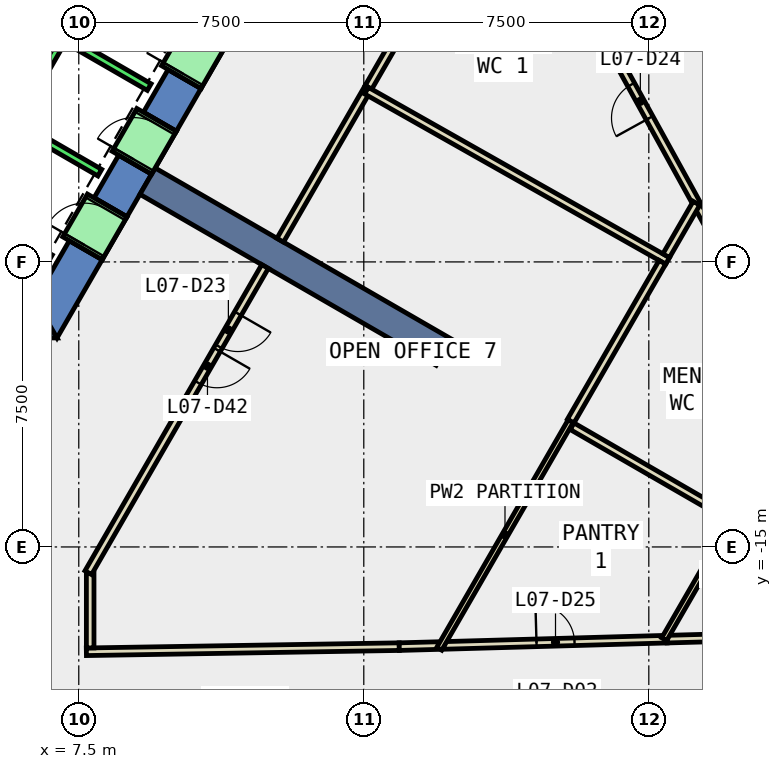
"""IFC4 building model, lengths in metres.
Left out: names, types, materials, properties, quantities, classifications, styles, units other than length and angle.
Written with IfcOpenShell. Run it as: python <this file> out.ifc"""

import sys

from ifc_helpers import new_model, si_unit, direction, frame, frame_2d, origin, place, context, subcontext, project, spatial, polyline, rectangle, outline, extrude, element, fill, save


model = new_model("IFC4")
c1 = context("Model", 3, precision=1e-05, world=origin(), true_north=direction((0.0, 1.0)))
c2 = subcontext(c1, "Body", "Model", "MODEL_VIEW")
j1 = project(units=[si_unit("LENGTHUNIT", "METRE"), si_unit("PLANEANGLEUNIT", "RADIAN")], contexts=[c1])
p1 = place(None, origin())
s1 = spatial("IfcSite", under=j1, at=p1, CompositionType="ELEMENT")
p2 = place(p1, origin())
s2 = spatial("IfcBuilding", under=s1, at=p2, CompositionType="ELEMENT")
p3 = place(p2, frame((0.0, 0.0, 39.2)))
s3 = spatial("IfcBuildingStorey", under=s2, at=p3, CompositionType="ELEMENT", Elevation=39.2)
p4 = place(p3, frame((0.0, 0.0, -0.4)))
e1 = element("IfcWall", 1, at=p4, inside=s3, PredefinedType="SHEAR", context=c2, shape_type="SweptSolid", body=[
    extrude(outline(polyline([(5.75, -8.5), (5.75, -9.5), (6.928, -9.5), (6.351, -8.5), (5.75, -8.5)])), origin(), (0.0, 0.0, 1.0), 4.2),
])
p5 = place(p3, frame((0.0, 0.0, -0.4)))
e2 = element("IfcWall", 2, at=p5, inside=s3, PredefinedType="SHEAR", context=c2, shape_type="SweptSolid", body=[
    extrude(outline(polyline([(8.117, -7.44), (7.252, -6.94), (6.351, -8.5), (6.928, -9.5), (8.117, -7.44)])), origin(), (0.0, 0.0, 1.0), 4.2),
])
p6 = place(p3, frame((0.0, 0.0, -0.4)))
e3 = element("IfcWall", 3, at=p6, inside=s3, PredefinedType="SHEAR", context=c2, shape_type="SweptSolid", body=[
    extrude(outline(polyline([(9.417, -5.189), (8.551, -4.689), (7.902, -5.814), (8.767, -6.314), (9.417, -5.189)])), origin(), (0.0, 0.0, 1.0), 4.2),
])
p7 = place(p3, frame((0.0, 0.0, -0.4)))
e4 = element("IfcWall", 4, at=p7, inside=s3, PredefinedType="SHEAR", context=c2, shape_type="SweptSolid", body=[
    extrude(outline(polyline([(10.717, -2.937), (9.851, -2.437), (9.201, -3.563), (10.067, -4.063), (10.717, -2.937)])), origin(), (0.0, 0.0, 1.0), 4.2),
])
p8 = place(p3, frame((0.0, 0.0, 3.6)))
e5 = element("IfcWall", 5, at=p8, inside=s3, PredefinedType="SHEAR", context=c2, shape_type="SweptSolid", body=[
    extrude(outline(polyline([(8.767, -6.314), (7.902, -5.814), (7.252, -6.94), (8.117, -7.44), (8.767, -6.314)])), origin(), (0.0, 0.0, 1.0), 0.2),
])
p9 = place(p3, frame((0.0, 0.0, 3.6)))
e6 = element("IfcWall", 6, at=p9, inside=s3, PredefinedType="SHEAR", context=c2, shape_type="SweptSolid", body=[
    extrude(outline(polyline([(10.067, -4.063), (9.201, -3.563), (8.551, -4.689), (9.417, -5.189), (10.067, -4.063)])), origin(), (0.0, 0.0, 1.0), 0.2),
])
p10 = place(p3, frame((0.0, 0.0, 3.6)))
e7 = element("IfcWall", 7, at=p10, inside=s3, PredefinedType="SHEAR", context=c2, shape_type="SweptSolid", body=[
    extrude(outline(polyline([(11.367, -1.811), (10.501, -1.311), (9.851, -2.437), (10.717, -2.937), (11.367, -1.811)])), origin(), (0.0, 0.0, 1.0), 0.2),
])
p11 = place(p3, frame((9.31, -5.375, -0.4), z_axis=(0.0, 0.0, 1.0), x_axis=(0.866017533419, -0.500013631625, 0.0)))
e8 = element("IfcWall", 8, at=p11, inside=s3, PredefinedType="SHEAR", context=c2, shape_type="SweptSolid", body=[
    extrude(rectangle(XDim=9.0, YDim=0.8, at=frame_2d((4.5, 0.0))), origin(), (0.0, 0.0, 1.0), 4.2),
])
p12 = place(p3, frame((7.7, -17.758, 0.0), z_axis=(0.0, 0.0, 1.0), x_axis=(0.999865574926, 0.016396099485, 0.0)))
e9 = element("IfcWall", 9, at=p12, inside=s3, PredefinedType="PARTITIONING", context=c2, shape_type="SweptSolid", body=[
    extrude(rectangle(XDim=8.234, YDim=0.2, at=frame_2d((4.117, 0.0))), origin(), (0.0, 0.0, 1.0), 3.8),
])
p13 = place(p3, frame((15.933, -17.623, 0.0), z_axis=(0.0, 0.0, 1.0), x_axis=(0.999627129061, 0.027305729179, 0.0)))
e10 = element("IfcWall", 10, at=p13, inside=s3, PredefinedType="PARTITIONING", context=c2, shape_type="SweptSolid", body=[
    extrude(rectangle(XDim=1.028, YDim=0.2, at=frame_2d((0.514, 0.0))), origin(), (0.0, 0.0, 1.0), 3.8),
])
p14 = place(p3, frame((23.803, -6.044, 0.0), z_axis=(0.0, 0.0, 1.0), x_axis=(-0.482588436287, 0.875847247619, 0.0)))
e11 = element("IfcWall", 11, at=p14, inside=s3, PredefinedType="PARTITIONING", context=c2, shape_type="SweptSolid", body=[
    extrude(rectangle(XDim=6.324, YDim=0.2, at=frame_2d((3.162, 0.0))), origin(), (0.0, 0.0, 1.0), 3.8),
])
p15 = place(p14, frame((2.662, 0.0, 0.0)))
e12 = element("IfcOpeningElement", 12, at=p15, cuts=e11, PredefinedType="OPENING", context=c2, shape_type="SweptSolid", body=[
    extrude(rectangle(XDim=1.0, YDim=2.1, at=frame_2d((0.5, 1.05))), frame((0.0, 0.11, 0.0), z_axis=(0.0, -1.0, 0.0), x_axis=(1.0, 0.0, 0.0)), (0.0, 0.0, 1.0), 0.22),
])
p16 = place(p3, frame((17.111, -17.591, 0.0), z_axis=(0.0, 0.0, 1.0), x_axis=(0.99960470841, 0.028114532261, 0.0)))
e13 = element("IfcWall", 13, at=p16, inside=s3, PredefinedType="PARTITIONING", context=c2, shape_type="SweptSolid", body=[
    extrude(rectangle(XDim=5.87, YDim=0.2, at=frame_2d((2.935, 0.0))), origin(), (0.0, 0.0, 1.0), 3.8),
])
p17 = place(p16, frame((2.435, 0.0, 0.0)))
e14 = element("IfcOpeningElement", 14, at=p17, cuts=e13, PredefinedType="OPENING", context=c2, shape_type="SweptSolid", body=[
    extrude(rectangle(XDim=1.0, YDim=2.1, at=frame_2d((0.5, 1.05))), frame((0.0, 0.11, 0.0), z_axis=(0.0, -1.0, 0.0), x_axis=(1.0, 0.0, 0.0)), (0.0, 0.0, 1.0), 0.22),
])
p18 = place(p3, frame((24.229, -6.818, 0.0), z_axis=(0.0, 0.0, 1.0), x_axis=(-0.482120251302, 0.876105052653, 0.0)))
e15 = element("IfcWall", 15, at=p18, inside=s3, PredefinedType="PARTITIONING", context=c2, shape_type="SweptSolid", body=[
    extrude(rectangle(XDim=0.884, YDim=0.2, at=frame_2d((0.442, 0.0))), origin(), (0.0, 0.0, 1.0), 3.8),
])
p19 = place(p3, frame((22.979, -17.426, 0.0), z_axis=(0.0, 0.0, 1.0), x_axis=(0.999623609507, 0.027434272674, 0.0)))
e16 = element("IfcWall", 16, at=p19, inside=s3, PredefinedType="PARTITIONING", context=c2, shape_type="SweptSolid", body=[
    extrude(rectangle(XDim=1.201, YDim=0.2, at=frame_2d((0.601, 0.0))), origin(), (0.0, 0.0, 1.0), 3.8),
])
p20 = place(p3, frame((22.847, 0.664, 0.0), z_axis=(0.0, 0.0, 1.0), x_axis=(0.482537844436, -0.875875121628, 0.0)))
e17 = element("IfcWall", 17, at=p20, inside=s3, PredefinedType="PARTITIONING", context=c2, shape_type="SweptSolid", body=[
    extrude(rectangle(XDim=3.542, YDim=0.2, at=frame_2d((1.771, 0.0))), origin(), (0.0, 0.0, 1.0), 3.8),
])
p21 = place(p3, frame((7.8, -15.69, 0.0), z_axis=(0.0, 0.0, 1.0), x_axis=(0.0, -1.0, 0.0)))
e18 = element("IfcWall", 18, at=p21, inside=s3, PredefinedType="PARTITIONING", context=c2, shape_type="SweptSolid", body=[
    extrude(rectangle(XDim=1.967, YDim=0.2, at=frame_2d((0.983, 0.0))), origin(), (0.0, 0.0, 1.0), 3.8),
])
p22 = place(p3, frame((15.122, -2.908, 0.0), z_axis=(0.0, 0.0, 1.0), x_axis=(-0.499922740561, -0.866070004948, 0.0)))
e19 = element("IfcWall", 19, at=p22, inside=s3, PredefinedType="PARTITIONING", context=c2, shape_type="SweptSolid", body=[
    extrude(rectangle(XDim=4.643, YDim=0.2, at=frame_2d((2.321, 0.0))), origin(), (0.0, 0.0, 1.0), 3.8),
])
p23 = place(p3, frame((18.705, 3.298, 0.0), z_axis=(0.0, 0.0, 1.0), x_axis=(-0.499993769413, -0.866029000986, 0.0)))
e20 = element("IfcWall", 20, at=p23, inside=s3, PredefinedType="PARTITIONING", context=c2, shape_type="SweptSolid", body=[
    extrude(rectangle(XDim=7.166, YDim=0.2, at=frame_2d((3.583, 0.0))), origin(), (0.0, 0.0, 1.0), 3.8),
])
p24 = place(p3, frame((15.072, -2.994, 0.0), z_axis=(0.0, 0.0, 1.0), x_axis=(0.87054185148, -0.49209438609, 0.0)))
e21 = element("IfcWall", 21, at=p24, inside=s3, PredefinedType="PARTITIONING", context=c2, shape_type="SweptSolid", body=[
    extrude(rectangle(XDim=9.1, YDim=0.2, at=frame_2d((4.55, 0.0))), origin(), (0.0, 0.0, 1.0), 3.8),
])
p25 = place(p3, frame((20.445, -11.688, 0.0), z_axis=(0.0, 0.0, 1.0), x_axis=(-0.500010633597, -0.866019264387, 0.0)))
e22 = element("IfcWall", 22, at=p25, inside=s3, PredefinedType="PARTITIONING", context=c2, shape_type="SweptSolid", body=[
    extrude(rectangle(XDim=6.918, YDim=0.15, at=frame_2d((3.459, 0.0))), origin(), (0.0, 0.0, 1.0), 3.8),
])
p26 = place(p3, frame((22.857, -7.51, 0.0), z_axis=(0.0, 0.0, 1.0), x_axis=(-0.499954636112, -0.866051593054, 0.0)))
e23 = element("IfcWall", 23, at=p26, inside=s3, PredefinedType="PARTITIONING", context=c2, shape_type="SweptSolid", body=[
    extrude(rectangle(XDim=4.824, YDim=0.2, at=frame_2d((2.412, 0.0))), origin(), (0.0, 0.0, 1.0), 3.8),
])
p27 = place(p3, frame((23.754, -5.956, 0.0), z_axis=(0.0, 0.0, 1.0), x_axis=(-0.500093796661, -0.865971243484, 0.0)))
e24 = element("IfcWall", 24, at=p27, inside=s3, PredefinedType="PARTITIONING", context=c2, shape_type="SweptSolid", body=[
    extrude(rectangle(XDim=1.594, YDim=0.2, at=frame_2d((0.797, 0.0))), origin(), (0.0, 0.0, 1.0), 3.8),
])
p28 = place(p3, frame((20.482, -11.824, 0.0), z_axis=(0.0, 0.0, 1.0), x_axis=(0.866022959057, -0.500004234368, 0.0)))
e25 = element("IfcWall", 25, at=p28, inside=s3, PredefinedType="PARTITIONING", context=c2, shape_type="SweptSolid", body=[
    extrude(rectangle(XDim=5.0, YDim=0.2, at=frame_2d((2.5, 0.0))), origin(), (0.0, 0.0, 1.0), 3.8),
])
p29 = place(p3, frame((24.675, -14.362, 0.0), z_axis=(0.0, 0.0, 1.0), x_axis=(-0.500187988959, -0.865916841101, 0.0)))
e26 = element("IfcWall", 26, at=p29, inside=s3, PredefinedType="PARTITIONING", context=c2, shape_type="SweptSolid", body=[
    extrude(rectangle(XDim=3.541, YDim=0.15, at=frame_2d((1.771, 0.0))), origin(), (0.0, 0.0, 1.0), 3.8),
])
p30 = place(p3, frame((12.401, -7.621, 0.0), z_axis=(0.0, 0.0, 1.0), x_axis=(-0.499983724212, -0.866034800411, 0.0)))
e27 = element("IfcWall", 27, at=p30, inside=s3, PredefinedType="PARTITIONING", context=c2, shape_type="SweptSolid", body=[
    extrude(rectangle(XDim=9.302, YDim=0.2, at=frame_2d((4.651, 0.0))), origin(), (0.0, 0.0, 1.0), 3.8),
])
p31 = place(p30, frame((1.429, 0.0, 0.0)))
e28 = element("IfcOpeningElement", 28, at=p31, cuts=e27, PredefinedType="OPENING", context=c2, shape_type="SweptSolid", body=[
    extrude(rectangle(XDim=1.0, YDim=2.1, at=frame_2d((0.5, 1.05))), frame((0.0, 0.11, 0.0), z_axis=(0.0, -1.0, 0.0), x_axis=(1.0, 0.0, 0.0)), (0.0, 0.0, 1.0), 0.22),
])
p32 = place(p30, frame((2.529, 0.0, 0.0)))
e29 = element("IfcOpeningElement", 29, at=p32, cuts=e27, PredefinedType="OPENING", context=c2, shape_type="SweptSolid", body=[
    extrude(rectangle(XDim=1.0, YDim=2.1, at=frame_2d((0.5, 1.05))), frame((0.0, 0.11, 0.0), z_axis=(0.0, -1.0, 0.0), x_axis=(1.0, 0.0, 0.0)), (0.0, 0.0, 1.0), 0.22),
])
p33 = place(p3, frame((5.492, -3.788, 0.0), z_axis=(0.0, 0.0, 1.0), x_axis=(0.500011755427, 0.866018616679, 0.0)))
e30 = element("IfcWall", 30, at=p33, inside=s3, PredefinedType="STANDARD", context=c2, shape_type="SweptSolid", body=[
    extrude(rectangle(XDim=2.8, YDim=0.2, at=frame_2d((1.4, 0.0))), origin(), (0.0, 0.0, 1.0), 3.8),
])
p34 = place(p3, frame((4.451, -6.19, 0.0), z_axis=(0.0, 0.0, 1.0), x_axis=(0.50000090737, 0.866024879913, 0.0)))
e31 = element("IfcWall", 31, at=p34, inside=s3, PredefinedType="STANDARD", context=c2, shape_type="SweptSolid", body=[
    extrude(rectangle(XDim=10.6, YDim=0.2, at=frame_2d((5.3, 0.0))), origin(), (0.0, 0.0, 1.0), 3.8),
])
for number, where, z_axis, x_axis in (
    (32, (4.588, -6.153, 0.0), (0.0, 0.0, 1.0), (0.866, -0.5, 0.0)),
    (33, (5.888, -3.902, 0.0), (0.0, 0.0, 1.0), (0.866, -0.5, 0.0)),
    (34, (7.188, -1.65, 0.0), (0.0, 0.0, 1.0), (0.866, -0.5, 0.0)),
):
    element("IfcWall", number, at=place(p3, frame(where, z_axis=z_axis, x_axis=x_axis)), inside=s3, PredefinedType="STANDARD", context=c2, shape_type="SweptSolid", body=[
        extrude(rectangle(XDim=2.5, YDim=0.2, at=frame_2d((1.25, 0.0))), origin(), (0.0, 0.0, 1.0), 3.8),
    ])
p35 = place(p3, frame((7.598, -7.14, 0.0), z_axis=(0.0, 0.0, 1.0), x_axis=(0.500362116554, 0.865816234728, 0.0)))
e35 = element("IfcWall", 35, at=p35, inside=s3, PredefinedType="STANDARD", context=c2, shape_type="SweptSolid", body=[
    extrude(rectangle(XDim=1.299, YDim=1.2, at=frame_2d((0.65, 0.0))), origin(), (0.0, 0.0, 1.0), 2.4),
])
p36 = place(p35, frame((0.1, 0.0, 0.0)))
e36 = element("IfcOpeningElement", 36, at=p36, cuts=e35, PredefinedType="OPENING", context=c2, shape_type="SweptSolid", body=[
    extrude(rectangle(XDim=1.1, YDim=2.3, at=frame_2d((0.55, 1.15))), frame((0.0, 0.61, 0.0), z_axis=(0.0, -1.0, 0.0), x_axis=(1.0, 0.0, 0.0)), (0.0, 0.0, 1.0), 1.22),
])
p37 = place(p3, frame((8.898, -4.889, 0.0), z_axis=(0.0, 0.0, 1.0), x_axis=(0.500036693733, 0.866004217611, 0.0)))
e37 = element("IfcWall", 37, at=p37, inside=s3, PredefinedType="STANDARD", context=c2, shape_type="SweptSolid", body=[
    extrude(rectangle(XDim=1.3, YDim=1.2, at=frame_2d((0.65, 0.0))), origin(), (0.0, 0.0, 1.0), 2.4),
])
p38 = place(p37, frame((0.1, 0.0, 0.0)))
e38 = element("IfcOpeningElement", 38, at=p38, cuts=e37, PredefinedType="OPENING", context=c2, shape_type="SweptSolid", body=[
    extrude(rectangle(XDim=1.1, YDim=2.3, at=frame_2d((0.55, 1.15))), frame((0.0, 0.61, 0.0), z_axis=(0.0, -1.0, 0.0), x_axis=(1.0, 0.0, 0.0)), (0.0, 0.0, 1.0), 1.22),
])
p39 = place(p3, frame((10.198, -2.637, 0.0), z_axis=(0.0, 0.0, 1.0), x_axis=(0.49989585183, 0.866085525409, 0.0)))
e39 = element("IfcWall", 39, at=p39, inside=s3, PredefinedType="STANDARD", context=c2, shape_type="SweptSolid", body=[
    extrude(rectangle(XDim=1.3, YDim=1.2, at=frame_2d((0.65, 0.0))), origin(), (0.0, 0.0, 1.0), 2.4),
])
p40 = place(p39, frame((0.1, 0.0, 0.0)))
e40 = element("IfcOpeningElement", 40, at=p40, cuts=e39, PredefinedType="OPENING", context=c2, shape_type="SweptSolid", body=[
    extrude(rectangle(XDim=1.1, YDim=2.3, at=frame_2d((0.55, 1.15))), frame((0.0, 0.61, 0.0), z_axis=(0.0, -1.0, 0.0), x_axis=(1.0, 0.0, 0.0)), (0.0, 0.0, 1.0), 1.22),
])
p41 = place(p31, origin())
e41 = element("IfcDoor", 41, at=p41, inside=s3, OperationType="SINGLE_SWING_LEFT", PredefinedType="DOOR", context=c2, shape_type="SweptSolid", body=[
    extrude(rectangle(XDim=1.0, YDim=2.1, at=frame_2d((0.5, 1.05))), frame((0.0, 0.025, 0.0), z_axis=(0.0, -1.0, 0.0), x_axis=(1.0, 0.0, 0.0)), (0.0, 0.0, 1.0), 0.05),
])
fill(e28, e41)
p42 = place(p15, origin())
e42 = element("IfcDoor", 42, at=p42, inside=s3, OperationType="SINGLE_SWING_LEFT", PredefinedType="DOOR", context=c2, shape_type="SweptSolid", body=[
    extrude(rectangle(XDim=1.0, YDim=2.1, at=frame_2d((0.5, 1.05))), frame((0.0, 0.025, 0.0), z_axis=(0.0, -1.0, 0.0), x_axis=(1.0, 0.0, 0.0)), (0.0, 0.0, 1.0), 0.05),
])
fill(e12, e42)
p43 = place(p17, origin())
e43 = element("IfcDoor", 43, at=p43, inside=s3, OperationType="SINGLE_SWING_LEFT", PredefinedType="DOOR", context=c2, shape_type="SweptSolid", body=[
    extrude(rectangle(XDim=1.0, YDim=2.1, at=frame_2d((0.5, 1.05))), frame((0.0, 0.025, 0.0), z_axis=(0.0, -1.0, 0.0), x_axis=(1.0, 0.0, 0.0)), (0.0, 0.0, 1.0), 0.05),
])
fill(e14, e43)
p44 = place(p32, origin())
e44 = element("IfcDoor", 44, at=p44, inside=s3, OperationType="SINGLE_SWING_RIGHT", PredefinedType="DOOR", context=c2, shape_type="SweptSolid", body=[
    extrude(rectangle(XDim=1.0, YDim=2.1, at=frame_2d((0.5, 1.05))), frame((0.0, 0.025, 0.0), z_axis=(0.0, -1.0, 0.0), x_axis=(1.0, 0.0, 0.0)), (0.0, 0.0, 1.0), 0.05),
])
fill(e29, e44)
p45 = place(p36, origin())
e45 = element("IfcDoor", 45, at=p45, inside=s3, OperationType="SLIDING_TO_LEFT", PredefinedType="DOOR", context=c2, shape_type="SweptSolid", body=[
    extrude(rectangle(XDim=1.1, YDim=2.3, at=frame_2d((0.55, 1.15))), frame((0.0, 0.025, 0.0), z_axis=(0.0, -1.0, 0.0), x_axis=(1.0, 0.0, 0.0)), (0.0, 0.0, 1.0), 0.05),
])
fill(e36, e45)
p46 = place(p38, origin())
e46 = element("IfcDoor", 46, at=p46, inside=s3, OperationType="SLIDING_TO_LEFT", PredefinedType="DOOR", context=c2, shape_type="SweptSolid", body=[
    extrude(rectangle(XDim=1.1, YDim=2.3, at=frame_2d((0.55, 1.15))), frame((0.0, 0.025, 0.0), z_axis=(0.0, -1.0, 0.0), x_axis=(1.0, 0.0, 0.0)), (0.0, 0.0, 1.0), 0.05),
])
fill(e38, e46)
p47 = place(p40, origin())
e47 = element("IfcDoor", 47, at=p47, inside=s3, OperationType="SLIDING_TO_LEFT", PredefinedType="DOOR", context=c2, shape_type="SweptSolid", body=[
    extrude(rectangle(XDim=1.1, YDim=2.3, at=frame_2d((0.55, 1.15))), frame((0.0, 0.025, 0.0), z_axis=(0.0, -1.0, 0.0), x_axis=(1.0, 0.0, 0.0)), (0.0, 0.0, 1.0), 0.05),
])
fill(e40, e47)
save(model, sys.argv[1])
